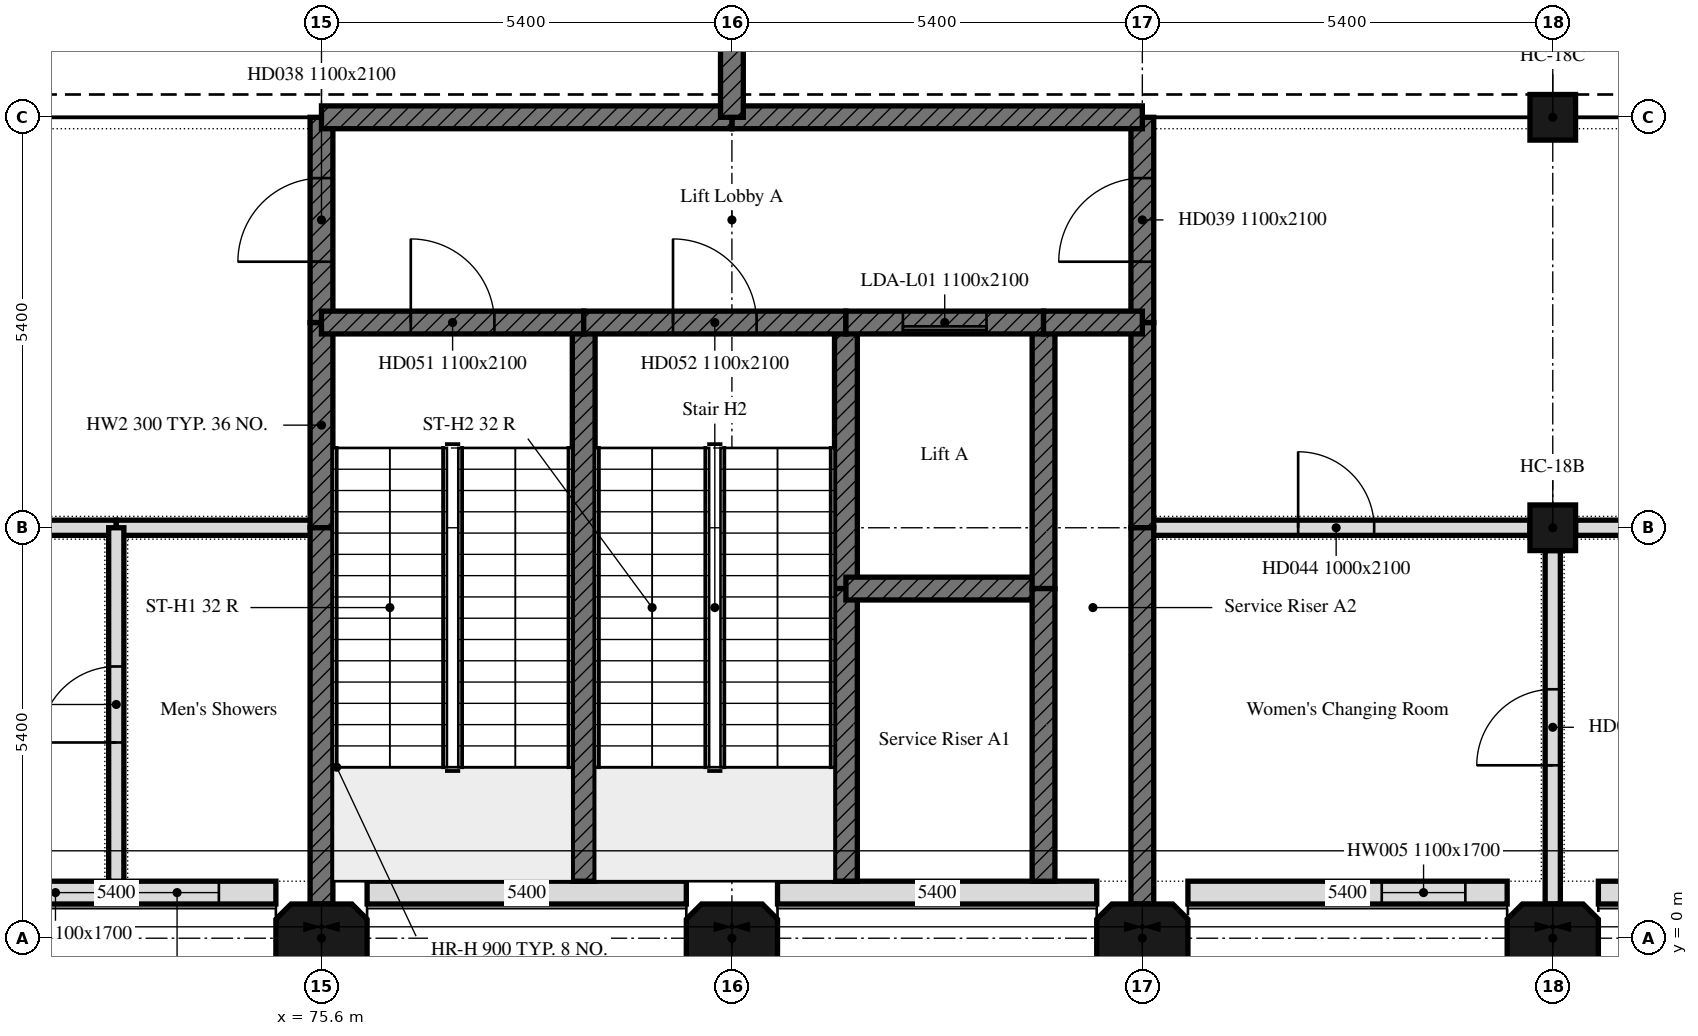
"""IFC4 building model, lengths in metres.
Left out: names, types, materials, properties, quantities, classifications, styles, units other than length and angle.
Written with IfcOpenShell. Run it as: python <this file> out.ifc"""

import sys

from ifc_helpers import new_model, si_unit, direction, frame, frame_2d, origin, origin_2d, place, context, subcontext, project, spatial, polyline, rectangle, outline, extrude, element, fill, save


model = new_model("IFC4")
c1 = context("Model", 3, precision=1e-05, world=origin(), true_north=direction((0.0, 1.0)))
c2 = subcontext(c1, "Body", "Model", "MODEL_VIEW")
j1 = project(units=[si_unit("LENGTHUNIT", "METRE"), si_unit("PLANEANGLEUNIT", "RADIAN")], contexts=[c1])
p1 = place(None, origin())
s1 = spatial("IfcSite", under=j1, at=p1, CompositionType="ELEMENT")
p2 = place(p1, origin())
s2 = spatial("IfcBuilding", under=s1, at=p2, CompositionType="ELEMENT")
p3 = place(p2, frame((0.0, 0.0, 8.4)))
s3 = spatial("IfcBuildingStorey", under=s2, at=p3, CompositionType="ELEMENT", Elevation=8.4)
for number, where, z_axis, x_axis in (
    (1, (75.6, 0.0, 0.0), (0.0, 0.0, 1.0), (1.0, 0.0, 0.0)),
    (2, (81.0, 0.0, 0.0), (0.0, 0.0, 1.0), (1.0, 0.0, 0.0)),
    (3, (86.4, 0.0, 0.0), (0.0, 0.0, 1.0), (1.0, 0.0, 0.0)),
    (4, (91.8, 0.0, 0.0), (0.0, 0.0, 1.0), (1.0, 0.0, 0.0)),
):
    element("IfcColumn", number, at=place(p3, frame(where, z_axis=z_axis, x_axis=x_axis)), inside=s3, PredefinedType="COLUMN", context=c2, shape_type="SweptSolid", body=[
        extrude(outline(polyline([(-0.4, -0.45), (0.4, -0.45), (0.6, -0.25), (0.6, 0.25), (0.4, 0.45), (-0.4, 0.45), (-0.6, 0.25), (-0.6, -0.25), (-0.4, -0.45)])), origin(), (0.0, 0.0, 1.0), 5.7),
    ])
for number, where, z_axis, x_axis in (
    (5, (91.8, 5.4, 0.0), (0.0, 0.0, 1.0), (1.0, 0.0, 0.0)),
    (6, (91.8, 10.8, 0.0), (0.0, 0.0, 1.0), (1.0, 0.0, 0.0)),
):
    element("IfcColumn", number, at=place(p3, frame(where, z_axis=z_axis, x_axis=x_axis)), inside=s3, PredefinedType="COLUMN", context=c2, shape_type="SweptSolid", body=[
        extrude(rectangle(XDim=0.6, YDim=0.6, at=origin_2d()), origin(), (0.0, 0.0, 1.0), 5.7),
    ])
p4 = place(p3, frame((70.8, 0.6, 0.0), z_axis=(0.0, 0.0, 1.0), x_axis=(1.0, 0.0, 0.0)))
e7 = element("IfcWall", 7, at=p4, inside=s3, PredefinedType="SOLIDWALL", context=c2, shape_type="SweptSolid", body=[
    extrude(rectangle(XDim=4.2, YDim=0.3, at=frame_2d((2.1, 0.0))), origin(), (0.0, 0.0, 1.0), 5.7),
])
p5 = place(p4, frame((0.75, 0.0, 0.9)))
e8 = element("IfcOpeningElement", 8, at=p5, cuts=e7, PredefinedType="OPENING", context=c2, shape_type="SweptSolid", body=[
    extrude(rectangle(XDim=1.1, YDim=1.7, at=frame_2d((0.55, 0.85))), frame((0.0, 0.15, 0.0), z_axis=(0.0, -1.0, 0.0), x_axis=(1.0, 0.0, 0.0)), (0.0, 0.0, 1.0), 0.3),
])
p6 = place(p4, frame((2.35, 0.0, 0.9)))
e9 = element("IfcOpeningElement", 9, at=p6, cuts=e7, PredefinedType="OPENING", context=c2, shape_type="SweptSolid", body=[
    extrude(rectangle(XDim=1.1, YDim=1.7, at=frame_2d((0.55, 0.85))), frame((0.0, 0.15, 0.0), z_axis=(0.0, -1.0, 0.0), x_axis=(1.0, 0.0, 0.0)), (0.0, 0.0, 1.0), 0.3),
])
for number, where, z_axis, x_axis in (
    (10, (76.2, 0.6, 0.0), (0.0, 0.0, 1.0), (1.0, 0.0, 0.0)),
    (11, (81.6, 0.6, 0.0), (0.0, 0.0, 1.0), (1.0, 0.0, 0.0)),
):
    element("IfcWall", number, at=place(p3, frame(where, z_axis=z_axis, x_axis=x_axis)), inside=s3, PredefinedType="SOLIDWALL", context=c2, shape_type="SweptSolid", body=[
        extrude(rectangle(XDim=4.2, YDim=0.3, at=frame_2d((2.1, 0.0))), origin(), (0.0, 0.0, 1.0), 5.7),
    ])
p7 = place(p3, frame((87.0, 0.6, 0.0), z_axis=(0.0, 0.0, 1.0), x_axis=(1.0, 0.0, 0.0)))
e12 = element("IfcWall", 12, at=p7, inside=s3, PredefinedType="SOLIDWALL", context=c2, shape_type="SweptSolid", body=[
    extrude(rectangle(XDim=4.2, YDim=0.3, at=frame_2d((2.1, 0.0))), origin(), (0.0, 0.0, 1.0), 5.7),
])
p8 = place(p7, frame((2.55, 0.0, 0.9)))
e13 = element("IfcOpeningElement", 13, at=p8, cuts=e12, PredefinedType="OPENING", context=c2, shape_type="SweptSolid", body=[
    extrude(rectangle(XDim=1.1, YDim=1.7, at=frame_2d((0.55, 0.85))), frame((0.0, 0.15, 0.0), z_axis=(0.0, -1.0, 0.0), x_axis=(1.0, 0.0, 0.0)), (0.0, 0.0, 1.0), 0.3),
])
p9 = place(p3, frame((92.4, 0.6, 0.0), z_axis=(0.0, 0.0, 1.0), x_axis=(1.0, 0.0, 0.0)))
e14 = element("IfcWall", 14, at=p9, inside=s3, PredefinedType="SOLIDWALL", context=c2, shape_type="SweptSolid", body=[
    extrude(rectangle(XDim=4.2, YDim=0.3, at=frame_2d((2.1, 0.0))), origin(), (0.0, 0.0, 1.0), 5.7),
])
p10 = place(p9, frame((0.4, 0.0, 0.9)))
e15 = element("IfcOpeningElement", 15, at=p10, cuts=e14, PredefinedType="OPENING", context=c2, shape_type="SweptSolid", body=[
    extrude(rectangle(XDim=3.4, YDim=1.7, at=frame_2d((1.7, 0.85))), frame((0.0, 0.15, 0.0), z_axis=(0.0, -1.0, 0.0), x_axis=(1.0, 0.0, 0.0)), (0.0, 0.0, 1.0), 0.3),
])
p11 = place(p3, frame((70.5, 5.4, 0.0), z_axis=(0.0, 0.0, 1.0), x_axis=(1.0, 0.0, 0.0)))
e16 = element("IfcWall", 16, at=p11, inside=s3, PredefinedType="PARTITIONING", context=c2, shape_type="SweptSolid", body=[
    extrude(rectangle(XDim=2.4, YDim=0.2, at=frame_2d((1.2, 0.0))), origin(), (0.0, 0.0, 1.0), 5.7),
])
p12 = place(p3, frame((72.9, 5.4, 0.0), z_axis=(0.0, 0.0, 1.0), x_axis=(1.0, 0.0, 0.0)))
e17 = element("IfcWall", 17, at=p12, inside=s3, PredefinedType="PARTITIONING", context=c2, shape_type="SweptSolid", body=[
    extrude(rectangle(XDim=2.7, YDim=0.2, at=frame_2d((1.35, 0.0))), origin(), (0.0, 0.0, 1.0), 5.7),
])
p13 = place(p3, frame((75.6, 5.4, 0.0), z_axis=(0.0, 0.0, 1.0), x_axis=(0.0, 1.0, 0.0)))
e18 = element("IfcWall", 18, at=p13, inside=s3, PredefinedType="SHEAR", context=c2, shape_type="SweptSolid", body=[
    extrude(rectangle(XDim=2.7, YDim=0.3, at=frame_2d((1.35, 0.0))), origin(), (0.0, 0.0, 1.0), 5.7),
])
p14 = place(p3, frame((75.6, 8.1, 0.0), z_axis=(0.0, 0.0, 1.0), x_axis=(0.0, 1.0, 0.0)))
e19 = element("IfcWall", 19, at=p14, inside=s3, PredefinedType="SHEAR", context=c2, shape_type="SweptSolid", body=[
    extrude(rectangle(XDim=2.7, YDim=0.3, at=frame_2d((1.35, 0.0))), origin(), (0.0, 0.0, 1.0), 5.7),
])
p15 = place(p14, frame((0.8, 0.0, 0.0)))
e20 = element("IfcOpeningElement", 20, at=p15, cuts=e19, PredefinedType="OPENING", context=c2, shape_type="SweptSolid", body=[
    extrude(rectangle(XDim=1.1, YDim=2.1, at=frame_2d((0.55, 1.05))), frame((0.0, 0.15, 0.0), z_axis=(0.0, -1.0, 0.0), x_axis=(1.0, 0.0, 0.0)), (0.0, 0.0, 1.0), 0.3),
])
p16 = place(p3, frame((86.4, 5.4, 0.0), z_axis=(0.0, 0.0, 1.0), x_axis=(1.0, 0.0, 0.0)))
e21 = element("IfcWall", 21, at=p16, inside=s3, PredefinedType="PARTITIONING", context=c2, shape_type="SweptSolid", body=[
    extrude(rectangle(XDim=5.1, YDim=0.2, at=frame_2d((2.55, 0.0))), origin(), (0.0, 0.0, 1.0), 5.7),
])
p17 = place(p16, frame((2.05, 0.0, 0.0)))
e22 = element("IfcOpeningElement", 22, at=p17, cuts=e21, PredefinedType="OPENING", context=c2, shape_type="SweptSolid", body=[
    extrude(rectangle(XDim=1.0, YDim=2.1, at=frame_2d((0.5, 1.05))), frame((0.0, 0.1, 0.0), z_axis=(0.0, -1.0, 0.0), x_axis=(1.0, 0.0, 0.0)), (0.0, 0.0, 1.0), 0.2),
])
p18 = place(p3, frame((92.1, 5.4, 0.0), z_axis=(0.0, 0.0, 1.0), x_axis=(1.0, 0.0, 0.0)))
e23 = element("IfcWall", 23, at=p18, inside=s3, PredefinedType="PARTITIONING", context=c2, shape_type="SweptSolid", body=[
    extrude(rectangle(XDim=4.8, YDim=0.2, at=frame_2d((2.4, 0.0))), origin(), (0.0, 0.0, 1.0), 5.7),
])
p19 = place(p3, frame((86.4, 5.4, 0.0), z_axis=(0.0, 0.0, 1.0), x_axis=(0.0, 1.0, 0.0)))
e24 = element("IfcWall", 24, at=p19, inside=s3, PredefinedType="SHEAR", context=c2, shape_type="SweptSolid", body=[
    extrude(rectangle(XDim=2.7, YDim=0.3, at=frame_2d((1.35, 0.0))), origin(), (0.0, 0.0, 1.0), 5.7),
])
p20 = place(p3, frame((86.4, 8.1, 0.0), z_axis=(0.0, 0.0, 1.0), x_axis=(0.0, 1.0, 0.0)))
e25 = element("IfcWall", 25, at=p20, inside=s3, PredefinedType="SHEAR", context=c2, shape_type="SweptSolid", body=[
    extrude(rectangle(XDim=2.7, YDim=0.3, at=frame_2d((1.35, 0.0))), origin(), (0.0, 0.0, 1.0), 5.7),
])
p21 = place(p20, frame((0.8, 0.0, 0.0)))
e26 = element("IfcOpeningElement", 26, at=p21, cuts=e25, PredefinedType="OPENING", context=c2, shape_type="SweptSolid", body=[
    extrude(rectangle(XDim=1.1, YDim=2.1, at=frame_2d((0.55, 1.05))), frame((0.0, 0.15, 0.0), z_axis=(0.0, -1.0, 0.0), x_axis=(1.0, 0.0, 0.0)), (0.0, 0.0, 1.0), 0.3),
])
p22 = place(p3, frame((72.9, 0.75, 0.0), z_axis=(0.0, 0.0, 1.0), x_axis=(0.0, 1.0, 0.0)))
e27 = element("IfcWall", 27, at=p22, inside=s3, PredefinedType="PARTITIONING", context=c2, shape_type="SweptSolid", body=[
    extrude(rectangle(XDim=4.65, YDim=0.2, at=frame_2d((2.325, 0.0))), origin(), (0.0, 0.0, 1.0), 5.7),
])
p23 = place(p22, frame((1.825, 0.0, 0.0)))
e28 = element("IfcOpeningElement", 28, at=p23, cuts=e27, PredefinedType="OPENING", context=c2, shape_type="SweptSolid", body=[
    extrude(rectangle(XDim=1.0, YDim=2.1, at=frame_2d((0.5, 1.05))), frame((0.0, 0.1, 0.0), z_axis=(0.0, -1.0, 0.0), x_axis=(1.0, 0.0, 0.0)), (0.0, 0.0, 1.0), 0.2),
])
p24 = place(p3, frame((75.6, 0.45, 0.0), z_axis=(0.0, 0.0, 1.0), x_axis=(0.0, 1.0, 0.0)))
e29 = element("IfcWall", 29, at=p24, inside=s3, PredefinedType="SHEAR", context=c2, shape_type="SweptSolid", body=[
    extrude(rectangle(XDim=4.95, YDim=0.3, at=frame_2d((2.475, 0.0))), origin(), (0.0, 0.0, 1.0), 5.7),
])
p25 = place(p3, frame((91.8, 0.45, 0.0), z_axis=(0.0, 0.0, 1.0), x_axis=(0.0, 1.0, 0.0)))
e30 = element("IfcWall", 30, at=p25, inside=s3, PredefinedType="PARTITIONING", context=c2, shape_type="SweptSolid", body=[
    extrude(rectangle(XDim=4.65, YDim=0.2, at=frame_2d((2.325, 0.0))), origin(), (0.0, 0.0, 1.0), 5.7),
])
p26 = place(p25, frame((1.825, 0.0, 0.0)))
e31 = element("IfcOpeningElement", 31, at=p26, cuts=e30, PredefinedType="OPENING", context=c2, shape_type="SweptSolid", body=[
    extrude(rectangle(XDim=1.0, YDim=2.1, at=frame_2d((0.5, 1.05))), frame((0.0, 0.1, 0.0), z_axis=(0.0, -1.0, 0.0), x_axis=(1.0, 0.0, 0.0)), (0.0, 0.0, 1.0), 0.2),
])
p27 = place(p3, frame((86.4, 0.45, 0.0), z_axis=(0.0, 0.0, 1.0), x_axis=(0.0, 1.0, 0.0)))
e32 = element("IfcWall", 32, at=p27, inside=s3, PredefinedType="SHEAR", context=c2, shape_type="SweptSolid", body=[
    extrude(rectangle(XDim=4.95, YDim=0.3, at=frame_2d((2.475, 0.0))), origin(), (0.0, 0.0, 1.0), 5.7),
])
p28 = place(p3, frame((79.05, 0.75, 0.0), z_axis=(0.0, 0.0, 1.0), x_axis=(0.0, 1.0, 0.0)))
e33 = element("IfcWall", 33, at=p28, inside=s3, PredefinedType="SHEAR", context=c2, shape_type="SweptSolid", body=[
    extrude(rectangle(XDim=7.35, YDim=0.3, at=frame_2d((3.675, 0.0))), origin(), (0.0, 0.0, 1.0), 5.7),
])
p29 = place(p3, frame((75.6, 8.1, 0.0), z_axis=(0.0, 0.0, 1.0), x_axis=(1.0, 0.0, 0.0)))
e34 = element("IfcWall", 34, at=p29, inside=s3, PredefinedType="SHEAR", context=c2, shape_type="SweptSolid", body=[
    extrude(rectangle(XDim=3.45, YDim=0.3, at=frame_2d((1.725, 0.0))), origin(), (0.0, 0.0, 1.0), 5.7),
])
p30 = place(p29, frame((1.175, 0.0, 0.0)))
e35 = element("IfcOpeningElement", 35, at=p30, cuts=e34, PredefinedType="OPENING", context=c2, shape_type="SweptSolid", body=[
    extrude(rectangle(XDim=1.1, YDim=2.1, at=frame_2d((0.55, 1.05))), frame((0.0, 0.15, 0.0), z_axis=(0.0, -1.0, 0.0), x_axis=(1.0, 0.0, 0.0)), (0.0, 0.0, 1.0), 0.3),
])
p31 = place(p3, frame((82.5, 4.6, 0.0), z_axis=(0.0, 0.0, 1.0), x_axis=(0.0, 1.0, 0.0)))
e36 = element("IfcWall", 36, at=p31, inside=s3, PredefinedType="SHEAR", context=c2, shape_type="SweptSolid", body=[
    extrude(rectangle(XDim=3.5, YDim=0.3, at=frame_2d((1.75, 0.0))), origin(), (0.0, 0.0, 1.0), 5.7),
])
p32 = place(p3, frame((82.5, 0.75, 0.0), z_axis=(0.0, 0.0, 1.0), x_axis=(0.0, 1.0, 0.0)))
e37 = element("IfcWall", 37, at=p32, inside=s3, PredefinedType="SHEAR", context=c2, shape_type="SweptSolid", body=[
    extrude(rectangle(XDim=3.85, YDim=0.3, at=frame_2d((1.925, 0.0))), origin(), (0.0, 0.0, 1.0), 5.7),
])
p33 = place(p3, frame((79.05, 8.1, 0.0), z_axis=(0.0, 0.0, 1.0), x_axis=(1.0, 0.0, 0.0)))
e38 = element("IfcWall", 38, at=p33, inside=s3, PredefinedType="SHEAR", context=c2, shape_type="SweptSolid", body=[
    extrude(rectangle(XDim=3.45, YDim=0.3, at=frame_2d((1.725, 0.0))), origin(), (0.0, 0.0, 1.0), 5.7),
])
p34 = place(p33, frame((1.175, 0.0, 0.0)))
e39 = element("IfcOpeningElement", 39, at=p34, cuts=e38, PredefinedType="OPENING", context=c2, shape_type="SweptSolid", body=[
    extrude(rectangle(XDim=1.1, YDim=2.1, at=frame_2d((0.55, 1.05))), frame((0.0, 0.15, 0.0), z_axis=(0.0, -1.0, 0.0), x_axis=(1.0, 0.0, 0.0)), (0.0, 0.0, 1.0), 0.3),
])
p35 = place(p3, frame((82.5, 4.6, 0.0), z_axis=(0.0, 0.0, 1.0), x_axis=(1.0, 0.0, 0.0)))
e40 = element("IfcWall", 40, at=p35, inside=s3, PredefinedType="SHEAR", context=c2, shape_type="SweptSolid", body=[
    extrude(rectangle(XDim=2.6, YDim=0.3, at=frame_2d((1.3, 0.0))), origin(), (0.0, 0.0, 1.0), 5.7),
])
p36 = place(p3, frame((85.1, 4.6, 0.0), z_axis=(0.0, 0.0, 1.0), x_axis=(0.0, 1.0, 0.0)))
e41 = element("IfcWall", 41, at=p36, inside=s3, PredefinedType="SHEAR", context=c2, shape_type="SweptSolid", body=[
    extrude(rectangle(XDim=3.5, YDim=0.3, at=frame_2d((1.75, 0.0))), origin(), (0.0, 0.0, 1.0), 5.7),
])
p37 = place(p3, frame((82.5, 8.1, 0.0), z_axis=(0.0, 0.0, 1.0), x_axis=(1.0, 0.0, 0.0)))
e42 = element("IfcWall", 42, at=p37, inside=s3, PredefinedType="SHEAR", context=c2, shape_type="SweptSolid", body=[
    extrude(rectangle(XDim=2.6, YDim=0.3, at=frame_2d((1.3, 0.0))), origin(), (0.0, 0.0, 1.0), 5.7),
])
p38 = place(p37, frame((0.75, 0.0, 0.0)))
e43 = element("IfcOpeningElement", 43, at=p38, cuts=e42, PredefinedType="OPENING", context=c2, shape_type="SweptSolid", body=[
    extrude(rectangle(XDim=1.1, YDim=2.1, at=frame_2d((0.55, 1.05))), frame((0.0, 0.15, 0.0), z_axis=(0.0, -1.0, 0.0), x_axis=(1.0, 0.0, 0.0)), (0.0, 0.0, 1.0), 0.3),
])
p39 = place(p3, frame((85.1, 0.75, 0.0), z_axis=(0.0, 0.0, 1.0), x_axis=(0.0, 1.0, 0.0)))
e44 = element("IfcWall", 44, at=p39, inside=s3, PredefinedType="SHEAR", context=c2, shape_type="SweptSolid", body=[
    extrude(rectangle(XDim=3.85, YDim=0.3, at=frame_2d((1.925, 0.0))), origin(), (0.0, 0.0, 1.0), 5.7),
])
p40 = place(p3, frame((85.1, 8.1, 0.0), z_axis=(0.0, 0.0, 1.0), x_axis=(1.0, 0.0, 0.0)))
e45 = element("IfcWall", 45, at=p40, inside=s3, PredefinedType="SHEAR", context=c2, shape_type="SweptSolid", body=[
    extrude(rectangle(XDim=1.3, YDim=0.3, at=frame_2d((0.65, 0.0))), origin(), (0.0, 0.0, 1.0), 5.7),
])
for number, where, z_axis, x_axis in (
    (46, (81.0, 10.8, 0.0), (0.0, 0.0, 1.0), (1.0, 0.0, 0.0)),
    (47, (75.6, 10.8, 0.0), (0.0, 0.0, 1.0), (1.0, 0.0, 0.0)),
):
    element("IfcWall", number, at=place(p3, frame(where, z_axis=z_axis, x_axis=x_axis)), inside=s3, PredefinedType="SHEAR", context=c2, shape_type="SweptSolid", body=[
        extrude(rectangle(XDim=5.4, YDim=0.3, at=frame_2d((2.7, 0.0))), origin(), (0.0, 0.0, 1.0), 5.7),
    ])
p41 = place(p3, frame((81.0, 10.8, 0.0), z_axis=(0.0, 0.0, 1.0), x_axis=(0.0, 1.0, 0.0)))
e48 = element("IfcWall", 48, at=p41, inside=s3, PredefinedType="SHEAR", context=c2, shape_type="SweptSolid", body=[
    extrude(rectangle(XDim=31.95, YDim=0.3, at=frame_2d((15.975, 0.0))), origin(), (0.0, 0.0, 1.0), 6.0),
])
p42 = place(p5, origin())
e49 = element("IfcWindow", 49, at=p42, inside=s3, PartitioningType="SINGLE_PANEL", PredefinedType="WINDOW", context=c2, shape_type="SweptSolid", body=[
    extrude(rectangle(XDim=1.1, YDim=1.7, at=frame_2d((0.55, 0.85))), frame((0.0, 0.03, 0.0), z_axis=(0.0, -1.0, 0.0), x_axis=(1.0, 0.0, 0.0)), (0.0, 0.0, 1.0), 0.06),
])
fill(e8, e49)
p43 = place(p6, origin())
e50 = element("IfcWindow", 50, at=p43, inside=s3, PartitioningType="SINGLE_PANEL", PredefinedType="WINDOW", context=c2, shape_type="SweptSolid", body=[
    extrude(rectangle(XDim=1.1, YDim=1.7, at=frame_2d((0.55, 0.85))), frame((0.0, 0.03, 0.0), z_axis=(0.0, -1.0, 0.0), x_axis=(1.0, 0.0, 0.0)), (0.0, 0.0, 1.0), 0.06),
])
fill(e9, e50)
p44 = place(p8, origin())
e51 = element("IfcWindow", 51, at=p44, inside=s3, PartitioningType="SINGLE_PANEL", PredefinedType="WINDOW", context=c2, shape_type="SweptSolid", body=[
    extrude(rectangle(XDim=1.1, YDim=1.7, at=frame_2d((0.55, 0.85))), frame((0.0, 0.03, 0.0), z_axis=(0.0, -1.0, 0.0), x_axis=(1.0, 0.0, 0.0)), (0.0, 0.0, 1.0), 0.06),
])
fill(e13, e51)
p45 = place(p15, origin())
e52 = element("IfcDoor", 52, at=p45, inside=s3, OperationType="SINGLE_SWING_LEFT", PredefinedType="DOOR", context=c2, shape_type="SweptSolid", body=[
    extrude(rectangle(XDim=1.1, YDim=2.1, at=frame_2d((0.55, 1.05))), frame((0.0, 0.025, 0.0), z_axis=(0.0, -1.0, 0.0), x_axis=(1.0, 0.0, 0.0)), (0.0, 0.0, 1.0), 0.05),
])
fill(e20, e52)
p46 = place(p21, origin())
e53 = element("IfcDoor", 53, at=p46, inside=s3, OperationType="SINGLE_SWING_LEFT", PredefinedType="DOOR", context=c2, shape_type="SweptSolid", body=[
    extrude(rectangle(XDim=1.1, YDim=2.1, at=frame_2d((0.55, 1.05))), frame((0.0, 0.025, 0.0), z_axis=(0.0, -1.0, 0.0), x_axis=(1.0, 0.0, 0.0)), (0.0, 0.0, 1.0), 0.05),
])
fill(e26, e53)
p47 = place(p23, origin())
e54 = element("IfcDoor", 54, at=p47, inside=s3, OperationType="SINGLE_SWING_LEFT", PredefinedType="DOOR", context=c2, shape_type="SweptSolid", body=[
    extrude(rectangle(XDim=1.0, YDim=2.1, at=frame_2d((0.5, 1.05))), frame((0.0, 0.025, 0.0), z_axis=(0.0, -1.0, 0.0), x_axis=(1.0, 0.0, 0.0)), (0.0, 0.0, 1.0), 0.05),
])
fill(e28, e54)
p48 = place(p17, origin())
e55 = element("IfcDoor", 55, at=p48, inside=s3, OperationType="SINGLE_SWING_LEFT", PredefinedType="DOOR", context=c2, shape_type="SweptSolid", body=[
    extrude(rectangle(XDim=1.0, YDim=2.1, at=frame_2d((0.5, 1.05))), frame((0.0, 0.025, 0.0), z_axis=(0.0, -1.0, 0.0), x_axis=(1.0, 0.0, 0.0)), (0.0, 0.0, 1.0), 0.05),
])
fill(e22, e55)
p49 = place(p26, origin())
e56 = element("IfcDoor", 56, at=p49, inside=s3, OperationType="SINGLE_SWING_LEFT", PredefinedType="DOOR", context=c2, shape_type="SweptSolid", body=[
    extrude(rectangle(XDim=1.0, YDim=2.1, at=frame_2d((0.5, 1.05))), frame((0.0, 0.025, 0.0), z_axis=(0.0, -1.0, 0.0), x_axis=(1.0, 0.0, 0.0)), (0.0, 0.0, 1.0), 0.05),
])
fill(e31, e56)
p50 = place(p30, origin())
e57 = element("IfcDoor", 57, at=p50, inside=s3, OperationType="SINGLE_SWING_LEFT", PredefinedType="DOOR", context=c2, shape_type="SweptSolid", body=[
    extrude(rectangle(XDim=1.1, YDim=2.1, at=frame_2d((0.55, 1.05))), frame((0.0, 0.025, 0.0), z_axis=(0.0, -1.0, 0.0), x_axis=(1.0, 0.0, 0.0)), (0.0, 0.0, 1.0), 0.05),
])
fill(e35, e57)
p51 = place(p34, origin())
e58 = element("IfcDoor", 58, at=p51, inside=s3, OperationType="SINGLE_SWING_LEFT", PredefinedType="DOOR", context=c2, shape_type="SweptSolid", body=[
    extrude(rectangle(XDim=1.1, YDim=2.1, at=frame_2d((0.55, 1.05))), frame((0.0, 0.025, 0.0), z_axis=(0.0, -1.0, 0.0), x_axis=(1.0, 0.0, 0.0)), (0.0, 0.0, 1.0), 0.05),
])
fill(e39, e58)
p52 = place(p38, origin())
e59 = element("IfcDoor", 59, at=p52, inside=s3, OperationType="SLIDING_TO_LEFT", PredefinedType="DOOR", context=c2, shape_type="SweptSolid", body=[
    extrude(rectangle(XDim=1.1, YDim=2.1, at=frame_2d((0.55, 1.05))), frame((0.0, 0.025, 0.0), z_axis=(0.0, -1.0, 0.0), x_axis=(1.0, 0.0, 0.0)), (0.0, 0.0, 1.0), 0.05),
])
fill(e43, e59)
save(model, sys.argv[1])
